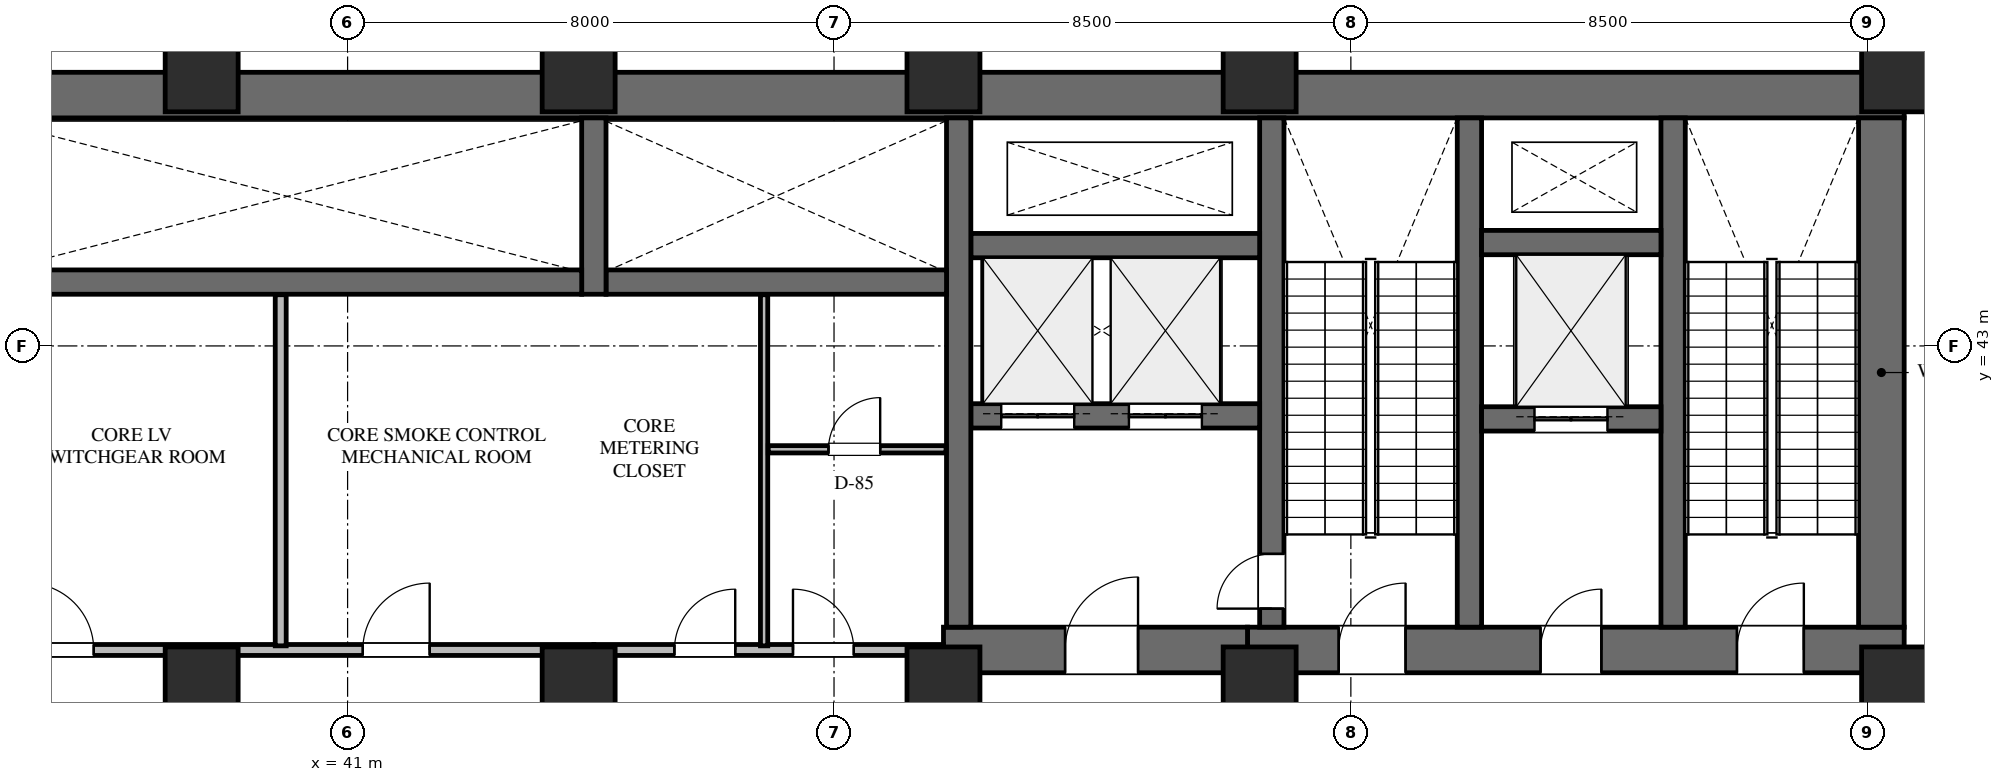
"""IFC4 building model, lengths in metres.
Left out: names, types, materials, properties, quantities, classifications, styles, units other than length and angle.
Written with IfcOpenShell. Run it as: python <this file> out.ifc"""

import sys

from ifc_helpers import new_model, si_unit, direction, frame, frame_2d, origin, origin_2d, place, context, subcontext, project, spatial, rectangle, extrude, element, fill, save


model = new_model("IFC4")
c1 = context("Model", 3, precision=1e-05, world=origin(), true_north=direction((0.0, 1.0)))
c2 = subcontext(c1, "Body", "Model", "MODEL_VIEW")
j1 = project(units=[si_unit("LENGTHUNIT", "METRE"), si_unit("PLANEANGLEUNIT", "RADIAN")], contexts=[c1])
p1 = place(None, origin())
s1 = spatial("IfcSite", under=j1, at=p1, CompositionType="ELEMENT")
p2 = place(p1, origin())
s2 = spatial("IfcBuilding", under=s1, at=p2, CompositionType="ELEMENT")
p3 = place(p2, frame((0.0, 0.0, 85.5)))
s3 = spatial("IfcBuildingStorey", under=s2, at=p3, CompositionType="ELEMENT", Elevation=85.5)
p4 = place(p3, frame((22.9, 47.125, 0.0), z_axis=(0.0, 0.0, 1.0), x_axis=(1.0, 0.0, 0.0)))
e1 = element("IfcWall", 1, at=p4, inside=s3, PredefinedType="SHEAR", context=c2, shape_type="SweptSolid", body=[
    extrude(rectangle(XDim=43.7, YDim=0.75, at=frame_2d((21.85, 0.0))), origin(), (0.0, 0.0, 1.0), 6.0),
])
p5 = place(p3, frame((55.8, 38.0, 0.0), z_axis=(0.0, 0.0, 1.0), x_axis=(1.0, 0.0, 0.0)))
e2 = element("IfcWall", 2, at=p5, inside=s3, PredefinedType="SHEAR", context=c2, shape_type="SweptSolid", body=[
    extrude(rectangle(XDim=10.8, YDim=0.75, at=frame_2d((5.4, 0.0))), origin(), (0.0, 0.0, 1.0), 6.0),
])
p6 = place(p5, frame((1.5, 0.0, 0.0)))
e3 = element("IfcOpeningElement", 3, at=p6, cuts=e2, PredefinedType="OPENING", context=c2, shape_type="SweptSolid", body=[
    extrude(rectangle(XDim=1.1, YDim=2.2, at=frame_2d((0.55, 1.1))), frame((0.0, 0.385, 0.0), z_axis=(0.0, -1.0, 0.0), x_axis=(1.0, 0.0, 0.0)), (0.0, 0.0, 1.0), 0.77),
])
p7 = place(p5, frame((4.82, 0.0, 0.0)))
e4 = element("IfcOpeningElement", 4, at=p7, cuts=e2, PredefinedType="OPENING", context=c2, shape_type="SweptSolid", body=[
    extrude(rectangle(XDim=1.0, YDim=2.15, at=frame_2d((0.5, 1.075))), frame((0.0, 0.385, 0.0), z_axis=(0.0, -1.0, 0.0), x_axis=(1.0, 0.0, 0.0)), (0.0, 0.0, 1.0), 0.77),
])
p8 = place(p5, frame((8.05, 0.0, 0.0)))
e5 = element("IfcOpeningElement", 5, at=p8, cuts=e2, PredefinedType="OPENING", context=c2, shape_type="SweptSolid", body=[
    extrude(rectangle(XDim=1.1, YDim=2.2, at=frame_2d((0.55, 1.1))), frame((0.0, 0.385, 0.0), z_axis=(0.0, -1.0, 0.0), x_axis=(1.0, 0.0, 0.0)), (0.0, 0.0, 1.0), 0.77),
])
p9 = place(p3, frame((66.225, 38.375, 0.0), z_axis=(0.0, 0.0, 1.0), x_axis=(0.0, 1.0, 0.0)))
e6 = element("IfcWall", 6, at=p9, inside=s3, PredefinedType="SHEAR", context=c2, shape_type="SweptSolid", body=[
    extrude(rectangle(XDim=8.375, YDim=0.75, at=frame_2d((4.188, 0.0))), origin(), (0.0, 0.0, 1.0), 6.0),
])
for number, where, z_axis, x_axis in (
    (7, (62.8, 38.375, 0.0), (0.0, 0.0, 1.0), (0.0, 1.0, 0.0)),
    (8, (59.45, 38.375, 0.0), (0.0, 0.0, 1.0), (0.0, 1.0, 0.0)),
):
    element("IfcWall", number, at=place(p3, frame(where, z_axis=z_axis, x_axis=x_axis)), inside=s3, PredefinedType="SHEAR", context=c2, shape_type="SweptSolid", body=[
        extrude(rectangle(XDim=8.375, YDim=0.4, at=frame_2d((4.188, 0.0))), origin(), (0.0, 0.0, 1.0), 6.0),
    ])
p10 = place(p3, frame((56.2, 38.375, 0.0), z_axis=(0.0, 0.0, 1.0), x_axis=(0.0, 1.0, 0.0)))
e9 = element("IfcWall", 9, at=p10, inside=s3, PredefinedType="SHEAR", context=c2, shape_type="SweptSolid", body=[
    extrude(rectangle(XDim=8.375, YDim=0.4, at=frame_2d((4.188, 0.0))), origin(), (0.0, 0.0, 1.0), 6.0),
])
p11 = place(p10, frame((0.305, 0.0, 0.0)))
e10 = element("IfcOpeningElement", 10, at=p11, cuts=e9, PredefinedType="OPENING", context=c2, shape_type="SweptSolid", body=[
    extrude(rectangle(XDim=0.9, YDim=2.15, at=frame_2d((0.45, 1.075))), frame((0.0, 0.21, 0.0), z_axis=(0.0, -1.0, 0.0), x_axis=(1.0, 0.0, 0.0)), (0.0, 0.0, 1.0), 0.42),
])
p12 = place(p3, frame((59.65, 41.8, 0.0), z_axis=(0.0, 0.0, 1.0), x_axis=(1.0, 0.0, 0.0)))
e11 = element("IfcWall", 11, at=p12, inside=s3, PredefinedType="SHEAR", context=c2, shape_type="SweptSolid", body=[
    extrude(rectangle(XDim=2.95, YDim=0.4, at=frame_2d((1.475, 0.0))), origin(), (0.0, 0.0, 1.0), 6.0),
])
p13 = place(p12, frame((0.87, 0.0, 0.0)))
e12 = element("IfcOpeningElement", 12, at=p13, cuts=e11, PredefinedType="OPENING", context=c2, shape_type="SweptSolid", body=[
    extrude(rectangle(XDim=1.2, YDim=2.2, at=frame_2d((0.6, 1.1))), frame((0.0, 0.21, 0.0), z_axis=(0.0, -1.0, 0.0), x_axis=(1.0, 0.0, 0.0)), (0.0, 0.0, 1.0), 0.42),
])
p14 = place(p3, frame((59.65, 44.7, 0.0), z_axis=(0.0, 0.0, 1.0), x_axis=(1.0, 0.0, 0.0)))
e13 = element("IfcWall", 13, at=p14, inside=s3, PredefinedType="SHEAR", context=c2, shape_type="SweptSolid", body=[
    extrude(rectangle(XDim=2.95, YDim=0.4, at=frame_2d((1.475, 0.0))), origin(), (0.0, 0.0, 1.0), 6.0),
])
p15 = place(p3, frame((50.8, 38.0, 0.0), z_axis=(0.0, 0.0, 1.0), x_axis=(1.0, 0.0, 0.0)))
e14 = element("IfcWall", 14, at=p15, inside=s3, PredefinedType="SHEAR", context=c2, shape_type="SweptSolid", body=[
    extrude(rectangle(XDim=5.0, YDim=0.75, at=frame_2d((2.5, 0.0))), origin(), (0.0, 0.0, 1.0), 6.0),
])
p16 = place(p15, frame((2.0, 0.0, 0.0)))
e15 = element("IfcOpeningElement", 15, at=p16, cuts=e14, PredefinedType="OPENING", context=c2, shape_type="SweptSolid", body=[
    extrude(rectangle(XDim=1.2, YDim=2.2, at=frame_2d((0.6, 1.1))), frame((0.0, 0.385, 0.0), z_axis=(0.0, -1.0, 0.0), x_axis=(1.0, 0.0, 0.0)), (0.0, 0.0, 1.0), 0.77),
])
p17 = place(p3, frame((51.25, 41.85, 0.0), z_axis=(0.0, 0.0, 1.0), x_axis=(1.0, 0.0, 0.0)))
e16 = element("IfcWall", 16, at=p17, inside=s3, PredefinedType="SHEAR", context=c2, shape_type="SweptSolid", body=[
    extrude(rectangle(XDim=4.75, YDim=0.4, at=frame_2d((2.375, 0.0))), origin(), (0.0, 0.0, 1.0), 6.0),
])
p18 = place(p17, frame((0.5, 0.0, 0.0)))
e17 = element("IfcOpeningElement", 17, at=p18, cuts=e16, PredefinedType="OPENING", context=c2, shape_type="SweptSolid", body=[
    extrude(rectangle(XDim=1.2, YDim=2.2, at=frame_2d((0.6, 1.1))), frame((0.0, 0.21, 0.0), z_axis=(0.0, -1.0, 0.0), x_axis=(1.0, 0.0, 0.0)), (0.0, 0.0, 1.0), 0.42),
])
p19 = place(p17, frame((2.6, 0.0, 0.0)))
e18 = element("IfcOpeningElement", 18, at=p19, cuts=e16, PredefinedType="OPENING", context=c2, shape_type="SweptSolid", body=[
    extrude(rectangle(XDim=1.2, YDim=2.2, at=frame_2d((0.6, 1.1))), frame((0.0, 0.21, 0.0), z_axis=(0.0, -1.0, 0.0), x_axis=(1.0, 0.0, 0.0)), (0.0, 0.0, 1.0), 0.42),
])
p20 = place(p3, frame((51.25, 44.65, 0.0), z_axis=(0.0, 0.0, 1.0), x_axis=(1.0, 0.0, 0.0)))
e19 = element("IfcWall", 19, at=p20, inside=s3, PredefinedType="SHEAR", context=c2, shape_type="SweptSolid", body=[
    extrude(rectangle(XDim=4.75, YDim=0.4, at=frame_2d((2.375, 0.0))), origin(), (0.0, 0.0, 1.0), 6.0),
])
p21 = place(p3, frame((51.05, 38.375, 0.0), z_axis=(0.0, 0.0, 1.0), x_axis=(0.0, 1.0, 0.0)))
e20 = element("IfcWall", 20, at=p21, inside=s3, PredefinedType="SHEAR", context=c2, shape_type="SweptSolid", body=[
    extrude(rectangle(XDim=8.375, YDim=0.4, at=frame_2d((4.188, 0.0))), origin(), (0.0, 0.0, 1.0), 6.0),
])
p22 = place(p3, frame((45.25, 44.05, 0.0), z_axis=(0.0, 0.0, 1.0), x_axis=(1.0, 0.0, 0.0)))
e21 = element("IfcWall", 21, at=p22, inside=s3, PredefinedType="SHEAR", context=c2, shape_type="SweptSolid", body=[
    extrude(rectangle(XDim=5.6, YDim=0.4, at=frame_2d((2.8, 0.0))), origin(), (0.0, 0.0, 1.0), 6.0),
])
p23 = place(p3, frame((45.05, 43.85, 0.0), z_axis=(0.0, 0.0, 1.0), x_axis=(0.0, 1.0, 0.0)))
e22 = element("IfcWall", 22, at=p23, inside=s3, PredefinedType="SHEAR", context=c2, shape_type="SweptSolid", body=[
    extrude(rectangle(XDim=2.9, YDim=0.4, at=frame_2d((1.45, 0.0))), origin(), (0.0, 0.0, 1.0), 6.0),
])
p24 = place(p3, frame((35.2, 44.05, 0.0), z_axis=(0.0, 0.0, 1.0), x_axis=(1.0, 0.0, 0.0)))
e23 = element("IfcWall", 23, at=p24, inside=s3, PredefinedType="SHEAR", context=c2, shape_type="SweptSolid", body=[
    extrude(rectangle(XDim=9.65, YDim=0.4, at=frame_2d((4.825, 0.0))), origin(), (0.0, 0.0, 1.0), 6.0),
])
for number, where, z_axis, x_axis in (
    (24, (66.5, 47.55, 0.0), (0.0, 0.0, 1.0), (1.0, 0.0, 0.0)),
    (25, (56.0, 47.55, 0.0), (0.0, 0.0, 1.0), (1.0, 0.0, 0.0)),
    (26, (66.5, 37.35, 0.0), (0.0, 0.0, 1.0), (1.0, 0.0, 0.0)),
    (27, (56.0, 37.35, 0.0), (0.0, 0.0, 1.0), (1.0, 0.0, 0.0)),
    (28, (50.8, 47.55, 0.0), (0.0, 0.0, 1.0), (1.0, 0.0, 0.0)),
    (29, (50.8, 37.35, 0.0), (0.0, 0.0, 1.0), (1.0, 0.0, 0.0)),
    (30, (44.8, 37.35, 0.0), (0.0, 0.0, 1.0), (1.0, 0.0, 0.0)),
    (31, (44.8, 47.55, 0.0), (0.0, 0.0, 1.0), (1.0, 0.0, 0.0)),
    (32, (38.6, 37.35, 0.0), (0.0, 0.0, 1.0), (1.0, 0.0, 0.0)),
    (33, (38.6, 47.55, 0.0), (0.0, 0.0, 1.0), (1.0, 0.0, 0.0)),
):
    element("IfcColumn", number, at=place(p3, frame(where, z_axis=z_axis, x_axis=x_axis)), inside=s3, PredefinedType="COLUMN", context=c2, shape_type="SweptSolid", body=[
        extrude(rectangle(XDim=1.2, YDim=1.4, at=origin_2d()), origin(), (0.0, 0.0, 1.0), 6.0),
    ])
p25 = place(p3, frame((45.05, 38.0, 0.0), z_axis=(0.0, 0.0, 1.0), x_axis=(1.0, 0.0, 0.0)))
e34 = element("IfcWall", 34, at=p25, inside=s3, PredefinedType="STANDARD", context=c2, shape_type="SweptSolid", body=[
    extrude(rectangle(XDim=5.75, YDim=0.18, at=frame_2d((2.875, 0.0))), origin(), (0.0, 0.0, 1.0), 4.818),
])
p26 = place(p25, frame((1.325, 0.0, 0.0)))
e35 = element("IfcOpeningElement", 35, at=p26, cuts=e34, PredefinedType="OPENING", context=c2, shape_type="SweptSolid", body=[
    extrude(rectangle(XDim=1.0, YDim=2.15, at=frame_2d((0.5, 1.075))), frame((0.0, 0.1, 0.0), z_axis=(0.0, -1.0, 0.0), x_axis=(1.0, 0.0, 0.0)), (0.0, 0.0, 1.0), 0.2),
])
p27 = place(p25, frame((3.275, 0.0, 0.0)))
e36 = element("IfcOpeningElement", 36, at=p27, cuts=e34, PredefinedType="OPENING", context=c2, shape_type="SweptSolid", body=[
    extrude(rectangle(XDim=1.0, YDim=2.15, at=frame_2d((0.5, 1.075))), frame((0.0, 0.1, 0.0), z_axis=(0.0, -1.0, 0.0), x_axis=(1.0, 0.0, 0.0)), (0.0, 0.0, 1.0), 0.2),
])
p28 = place(p3, frame((47.85, 38.068, 0.0), z_axis=(0.0, 0.0, 1.0), x_axis=(0.0, 1.0, 0.0)))
e37 = element("IfcWall", 37, at=p28, inside=s3, PredefinedType="PARTITIONING", context=c2, shape_type="SweptSolid", body=[
    extrude(rectangle(XDim=5.774, YDim=0.12, at=frame_2d((2.887, 0.0))), origin(), (0.0, 0.0, 1.0), 5.745),
])
p29 = place(p3, frame((47.918, 41.3, 0.0), z_axis=(0.0, 0.0, 1.0), x_axis=(1.0, 0.0, 0.0)))
e38 = element("IfcWall", 38, at=p29, inside=s3, PredefinedType="PARTITIONING", context=c2, shape_type="SweptSolid", body=[
    extrude(rectangle(XDim=2.924, YDim=0.12, at=frame_2d((1.462, 0.0))), origin(), (0.0, 0.0, 1.0), 4.818),
])
p30 = place(p29, frame((0.991, 0.0, 0.0)))
e39 = element("IfcOpeningElement", 39, at=p30, cuts=e38, PredefinedType="OPENING", context=c2, shape_type="SweptSolid", body=[
    extrude(rectangle(XDim=0.85, YDim=2.1, at=frame_2d((0.425, 1.05))), frame((0.0, 0.07, 0.0), z_axis=(0.0, -1.0, 0.0), x_axis=(1.0, 0.0, 0.0)), (0.0, 0.0, 1.0), 0.14),
])
p31 = place(p3, frame((35.0, 38.0, 0.0), z_axis=(0.0, 0.0, 1.0), x_axis=(1.0, 0.0, 0.0)))
e40 = element("IfcWall", 40, at=p31, inside=s3, PredefinedType="STANDARD", context=c2, shape_type="SweptSolid", body=[
    extrude(rectangle(XDim=10.05, YDim=0.18, at=frame_2d((5.025, 0.0))), origin(), (0.0, 0.0, 1.0), 4.818),
])
p32 = place(p31, frame((0.725, 0.0, 0.0)))
e41 = element("IfcOpeningElement", 41, at=p32, cuts=e40, PredefinedType="OPENING", context=c2, shape_type="SweptSolid", body=[
    extrude(rectangle(XDim=1.1, YDim=2.2, at=frame_2d((0.55, 1.1))), frame((0.0, 0.1, 0.0), z_axis=(0.0, -1.0, 0.0), x_axis=(1.0, 0.0, 0.0)), (0.0, 0.0, 1.0), 0.2),
])
p33 = place(p31, frame((6.25, 0.0, 0.0)))
e42 = element("IfcOpeningElement", 42, at=p33, cuts=e40, PredefinedType="OPENING", context=c2, shape_type="SweptSolid", body=[
    extrude(rectangle(XDim=1.1, YDim=2.2, at=frame_2d((0.55, 1.1))), frame((0.0, 0.1, 0.0), z_axis=(0.0, -1.0, 0.0), x_axis=(1.0, 0.0, 0.0)), (0.0, 0.0, 1.0), 0.2),
])
p34 = place(p3, frame((39.9, 38.068, 0.0), z_axis=(0.0, 0.0, 1.0), x_axis=(0.0, 1.0, 0.0)))
e43 = element("IfcWall", 43, at=p34, inside=s3, PredefinedType="STANDARD", context=c2, shape_type="SweptSolid", body=[
    extrude(rectangle(XDim=5.774, YDim=0.18, at=frame_2d((2.887, 0.0))), origin(), (0.0, 0.0, 1.0), 5.745),
])
p35 = place(p3, frame((66.5, 34.468, 0.0), z_axis=(0.0, 0.0, 1.0), x_axis=(0.0, 1.0, 0.0)))
e44 = element("IfcWall", 44, at=p35, inside=s3, PredefinedType="STANDARD", context=c2, shape_type="SweptSolid", body=[
    extrude(rectangle(XDim=3.149, YDim=0.18, at=frame_2d((1.574, 0.0))), origin(), (0.0, 0.0, 1.0), 4.818),
])
p36 = place(p6, origin())
e45 = element("IfcDoor", 45, at=p36, inside=s3, OperationType="SINGLE_SWING_RIGHT", PredefinedType="DOOR", context=c2, shape_type="SweptSolid", body=[
    extrude(rectangle(XDim=1.1, YDim=2.2, at=frame_2d((0.55, 1.1))), frame((0.0, 0.025, 0.0), z_axis=(0.0, -1.0, 0.0), x_axis=(1.0, 0.0, 0.0)), (0.0, 0.0, 1.0), 0.05),
])
fill(e3, e45)
p37 = place(p7, origin())
e46 = element("IfcDoor", 46, at=p37, inside=s3, OperationType="SINGLE_SWING_RIGHT", PredefinedType="DOOR", context=c2, shape_type="SweptSolid", body=[
    extrude(rectangle(XDim=1.0, YDim=2.15, at=frame_2d((0.5, 1.075))), frame((0.0, 0.025, 0.0), z_axis=(0.0, -1.0, 0.0), x_axis=(1.0, 0.0, 0.0)), (0.0, 0.0, 1.0), 0.05),
])
fill(e4, e46)
p38 = place(p8, origin())
e47 = element("IfcDoor", 47, at=p38, inside=s3, OperationType="SINGLE_SWING_RIGHT", PredefinedType="DOOR", context=c2, shape_type="SweptSolid", body=[
    extrude(rectangle(XDim=1.1, YDim=2.2, at=frame_2d((0.55, 1.1))), frame((0.0, 0.025, 0.0), z_axis=(0.0, -1.0, 0.0), x_axis=(1.0, 0.0, 0.0)), (0.0, 0.0, 1.0), 0.05),
])
fill(e5, e47)
p39 = place(p16, origin())
e48 = element("IfcDoor", 48, at=p39, inside=s3, OperationType="SINGLE_SWING_RIGHT", PredefinedType="DOOR", context=c2, shape_type="SweptSolid", body=[
    extrude(rectangle(XDim=1.2, YDim=2.2, at=frame_2d((0.6, 1.1))), frame((0.0, 0.025, 0.0), z_axis=(0.0, -1.0, 0.0), x_axis=(1.0, 0.0, 0.0)), (0.0, 0.0, 1.0), 0.05),
])
fill(e15, e48)
p40 = place(p11, origin())
e49 = element("IfcDoor", 49, at=p40, inside=s3, OperationType="SINGLE_SWING_LEFT", PredefinedType="DOOR", context=c2, shape_type="SweptSolid", body=[
    extrude(rectangle(XDim=0.9, YDim=2.15, at=frame_2d((0.45, 1.075))), frame((0.0, 0.025, 0.0), z_axis=(0.0, -1.0, 0.0), x_axis=(1.0, 0.0, 0.0)), (0.0, 0.0, 1.0), 0.05),
])
fill(e10, e49)
p41 = place(p18, origin())
e50 = element("IfcDoor", 50, at=p41, inside=s3, OperationType="DOUBLE_DOOR_SLIDING", PredefinedType="DOOR", context=c2, shape_type="SweptSolid", body=[
    extrude(rectangle(XDim=1.2, YDim=2.2, at=frame_2d((0.6, 1.1))), frame((0.0, 0.025, 0.0), z_axis=(0.0, -1.0, 0.0), x_axis=(1.0, 0.0, 0.0)), (0.0, 0.0, 1.0), 0.05),
])
fill(e17, e50)
p42 = place(p19, origin())
e51 = element("IfcDoor", 51, at=p42, inside=s3, OperationType="DOUBLE_DOOR_SLIDING", PredefinedType="DOOR", context=c2, shape_type="SweptSolid", body=[
    extrude(rectangle(XDim=1.2, YDim=2.2, at=frame_2d((0.6, 1.1))), frame((0.0, 0.025, 0.0), z_axis=(0.0, -1.0, 0.0), x_axis=(1.0, 0.0, 0.0)), (0.0, 0.0, 1.0), 0.05),
])
fill(e18, e51)
p43 = place(p13, origin())
e52 = element("IfcDoor", 52, at=p43, inside=s3, OperationType="DOUBLE_DOOR_SLIDING", PredefinedType="DOOR", context=c2, shape_type="SweptSolid", body=[
    extrude(rectangle(XDim=1.2, YDim=2.2, at=frame_2d((0.6, 1.1))), frame((0.0, 0.025, 0.0), z_axis=(0.0, -1.0, 0.0), x_axis=(1.0, 0.0, 0.0)), (0.0, 0.0, 1.0), 0.05),
])
fill(e12, e52)
p44 = place(p26, origin())
e53 = element("IfcDoor", 53, at=p44, inside=s3, OperationType="SINGLE_SWING_RIGHT", PredefinedType="DOOR", context=c2, shape_type="SweptSolid", body=[
    extrude(rectangle(XDim=1.0, YDim=2.15, at=frame_2d((0.5, 1.075))), frame((0.0, 0.025, 0.0), z_axis=(0.0, -1.0, 0.0), x_axis=(1.0, 0.0, 0.0)), (0.0, 0.0, 1.0), 0.05),
])
fill(e35, e53)
p45 = place(p27, origin())
e54 = element("IfcDoor", 54, at=p45, inside=s3, OperationType="SINGLE_SWING_LEFT", PredefinedType="DOOR", context=c2, shape_type="SweptSolid", body=[
    extrude(rectangle(XDim=1.0, YDim=2.15, at=frame_2d((0.5, 1.075))), frame((0.0, 0.025, 0.0), z_axis=(0.0, -1.0, 0.0), x_axis=(1.0, 0.0, 0.0)), (0.0, 0.0, 1.0), 0.05),
])
fill(e36, e54)
p46 = place(p30, origin())
e55 = element("IfcDoor", 55, at=p46, inside=s3, OperationType="SINGLE_SWING_RIGHT", PredefinedType="DOOR", context=c2, shape_type="SweptSolid", body=[
    extrude(rectangle(XDim=0.85, YDim=2.1, at=frame_2d((0.425, 1.05))), frame((0.0, 0.025, 0.0), z_axis=(0.0, -1.0, 0.0), x_axis=(1.0, 0.0, 0.0)), (0.0, 0.0, 1.0), 0.05),
])
fill(e39, e55)
p47 = place(p32, origin())
e56 = element("IfcDoor", 56, at=p47, inside=s3, OperationType="SINGLE_SWING_LEFT", PredefinedType="DOOR", context=c2, shape_type="SweptSolid", body=[
    extrude(rectangle(XDim=1.1, YDim=2.2, at=frame_2d((0.55, 1.1))), frame((0.0, 0.025, 0.0), z_axis=(0.0, -1.0, 0.0), x_axis=(1.0, 0.0, 0.0)), (0.0, 0.0, 1.0), 0.05),
])
fill(e41, e56)
p48 = place(p33, origin())
e57 = element("IfcDoor", 57, at=p48, inside=s3, OperationType="SINGLE_SWING_RIGHT", PredefinedType="DOOR", context=c2, shape_type="SweptSolid", body=[
    extrude(rectangle(XDim=1.1, YDim=2.2, at=frame_2d((0.55, 1.1))), frame((0.0, 0.025, 0.0), z_axis=(0.0, -1.0, 0.0), x_axis=(1.0, 0.0, 0.0)), (0.0, 0.0, 1.0), 0.05),
])
fill(e42, e57)
save(model, sys.argv[1])
